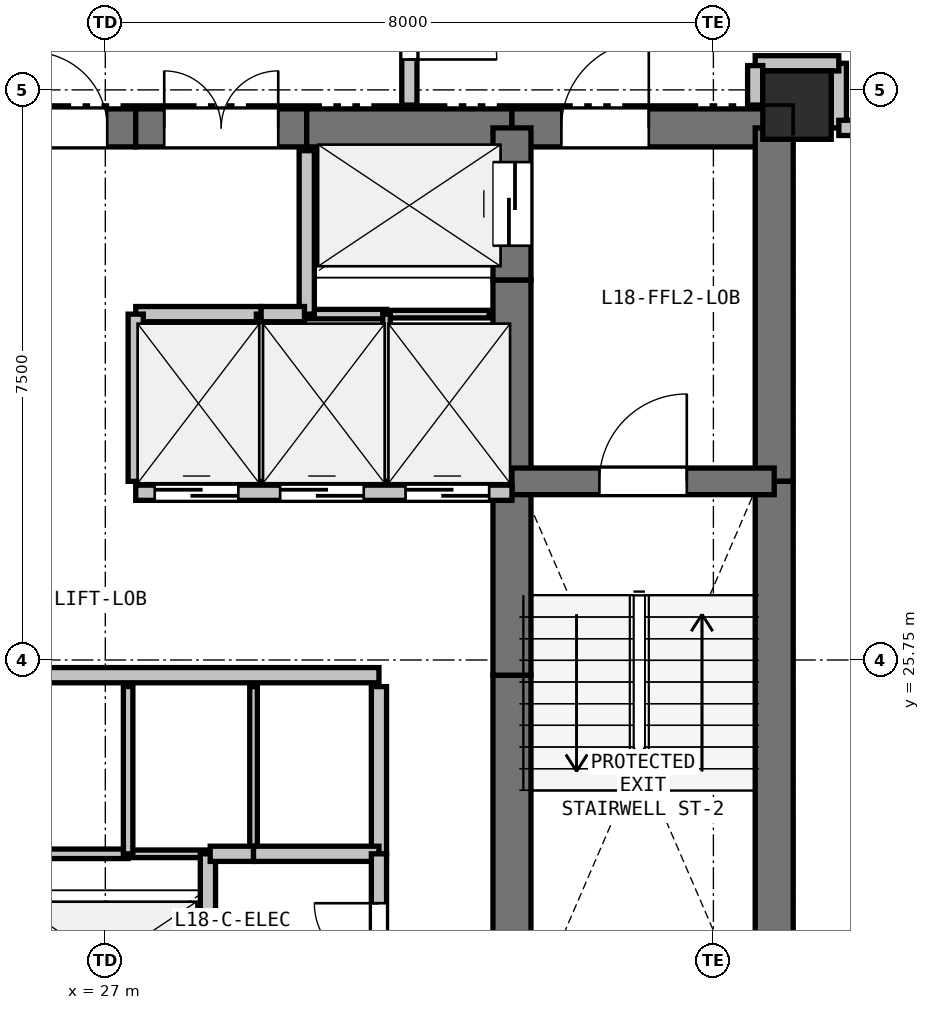
"""IFC4 building model, lengths in metres.
Left out: names, types, materials, properties, quantities, classifications, styles, units other than length and angle.
Written with IfcOpenShell. Run it as: python <this file> out.ifc"""

import sys

from ifc_helpers import new_model, si_unit, direction, frame, frame_2d, origin, origin_2d, place, context, subcontext, project, spatial, rectangle, extrude, element, fill, save


model = new_model("IFC4")
c1 = context("Model", 3, precision=1e-05, world=origin(), true_north=direction((0.0, 1.0)))
c2 = subcontext(c1, "Body", "Model", "MODEL_VIEW")
j1 = project(units=[si_unit("LENGTHUNIT", "METRE"), si_unit("PLANEANGLEUNIT", "RADIAN")], contexts=[c1])
p1 = place(None, origin())
s1 = spatial("IfcSite", under=j1, at=p1, CompositionType="ELEMENT")
p2 = place(p1, origin())
s2 = spatial("IfcBuilding", under=s1, at=p2, CompositionType="ELEMENT")
p3 = place(p2, frame((0.0, 0.0, 66.9)))
s3 = spatial("IfcBuildingStorey", under=s2, at=p3, CompositionType="ELEMENT", Elevation=66.9)
p4 = place(p3, frame((36.1, 33.05, 0.0), z_axis=(0.0, 0.0, 1.0), x_axis=(1.0, 0.0, 0.0)))
e1 = element("IfcColumn", 1, at=p4, inside=s3, PredefinedType="COLUMN", context=c2, shape_type="SweptSolid", body=[
    extrude(rectangle(XDim=0.9, YDim=0.9, at=origin_2d()), origin(), (0.0, 0.0, 1.0), 6.6),
])
for number, where, z_axis, x_axis in (
    (2, (7.087, 28.11, 0.0), (0.0, 0.0, 1.0), (0.866, 0.5, 0.0)),
    (3, (38.779, 7.092, 0.0), (0.0, 0.0, 1.0), (-0.866, 0.5, 0.0)),
):
    element("IfcWall", number, at=place(p3, frame(where, z_axis=z_axis, x_axis=x_axis)), inside=s3, PredefinedType="SOLIDWALL", context=c2, shape_type="SweptSolid", body=[
        extrude(rectangle(XDim=36.595, YDim=0.25, at=frame_2d((18.297, 0.0))), origin(), (0.0, 0.0, 1.0), 5.723),
    ])
p5 = place(p3, frame((25.65, 32.75, 0.0), z_axis=(0.0, 0.0, 1.0), x_axis=(1.0, 0.0, 0.0)))
e4 = element("IfcWall", 4, at=p5, inside=s3, PredefinedType="SHEAR", context=c2, shape_type="SweptSolid", body=[
    extrude(rectangle(XDim=1.75, YDim=0.5, at=frame_2d((0.875, 0.0))), origin(), (0.0, 0.0, 1.0), 6.35),
])
p6 = place(p5, frame((0.375, 0.0, 0.0)))
e5 = element("IfcOpeningElement", 5, at=p6, cuts=e4, PredefinedType="OPENING", context=c2, shape_type="SweptSolid", body=[
    extrude(rectangle(XDim=1.0, YDim=2.15, at=frame_2d((0.5, 1.075))), frame((0.0, 0.26, 0.0), z_axis=(0.0, -1.0, 0.0), x_axis=(1.0, 0.0, 0.0)), (0.0, 0.0, 1.0), 0.52),
])
p7 = place(p3, frame((27.4, 32.75, 0.0), z_axis=(0.0, 0.0, 1.0), x_axis=(1.0, 0.0, 0.0)))
e6 = element("IfcWall", 6, at=p7, inside=s3, PredefinedType="SHEAR", context=c2, shape_type="SweptSolid", body=[
    extrude(rectangle(XDim=2.25, YDim=0.5, at=frame_2d((1.125, 0.0))), origin(), (0.0, 0.0, 1.0), 6.35),
])
p8 = place(p7, frame((0.375, 0.0, 0.0)))
e7 = element("IfcOpeningElement", 7, at=p8, cuts=e6, PredefinedType="OPENING", context=c2, shape_type="SweptSolid", body=[
    extrude(rectangle(XDim=1.5, YDim=2.2, at=frame_2d((0.75, 1.1))), frame((0.0, 0.26, 0.0), z_axis=(0.0, -1.0, 0.0), x_axis=(1.0, 0.0, 0.0)), (0.0, 0.0, 1.0), 0.52),
])
p9 = place(p3, frame((29.65, 32.75, 0.0), z_axis=(0.0, 0.0, 1.0), x_axis=(1.0, 0.0, 0.0)))
e8 = element("IfcWall", 8, at=p9, inside=s3, PredefinedType="SHEAR", context=c2, shape_type="SweptSolid", body=[
    extrude(rectangle(XDim=2.7, YDim=0.5, at=frame_2d((1.35, 0.0))), origin(), (0.0, 0.0, 1.0), 6.35),
])
p10 = place(p3, frame((32.35, 32.75, 0.0), z_axis=(0.0, 0.0, 1.0), x_axis=(1.0, 0.0, 0.0)))
e9 = element("IfcWall", 9, at=p10, inside=s3, PredefinedType="SHEAR", context=c2, shape_type="SweptSolid", body=[
    extrude(rectangle(XDim=3.45, YDim=0.5, at=frame_2d((1.725, 0.0))), origin(), (0.0, 0.0, 1.0), 6.35),
])
p11 = place(p10, frame((0.65, 0.0, 0.0)))
e10 = element("IfcOpeningElement", 10, at=p11, cuts=e9, PredefinedType="OPENING", context=c2, shape_type="SweptSolid", body=[
    extrude(rectangle(XDim=1.15, YDim=2.15, at=frame_2d((0.575, 1.075))), frame((0.0, 0.26, 0.0), z_axis=(0.0, -1.0, 0.0), x_axis=(1.0, 0.0, 0.0)), (0.0, 0.0, 1.0), 0.52),
])
p12 = place(p3, frame((35.8, 32.75, 0.0), z_axis=(0.0, 0.0, 1.0), x_axis=(0.0, -1.0, 0.0)))
e11 = element("IfcWall", 11, at=p12, inside=s3, PredefinedType="SHEAR", context=c2, shape_type="SweptSolid", body=[
    extrude(rectangle(XDim=4.65, YDim=0.5, at=frame_2d((2.325, 0.0))), origin(), (0.0, 0.0, 1.0), 6.35),
])
p13 = place(p3, frame((35.8, 28.1, 0.0), z_axis=(0.0, 0.0, 1.0), x_axis=(0.0, -1.0, 0.0)))
e12 = element("IfcWall", 12, at=p13, inside=s3, PredefinedType="SHEAR", context=c2, shape_type="SweptSolid", body=[
    extrude(rectangle(XDim=7.35, YDim=0.5, at=frame_2d((3.675, 0.0))), origin(), (0.0, 0.0, 1.0), 6.35),
])
p14 = place(p3, frame((32.35, 20.75, 0.0), z_axis=(0.0, 0.0, 1.0), x_axis=(0.0, 1.0, 0.0)))
e13 = element("IfcWall", 13, at=p14, inside=s3, PredefinedType="SHEAR", context=c2, shape_type="SweptSolid", body=[
    extrude(rectangle(XDim=4.8, YDim=0.5, at=frame_2d((2.4, 0.0))), origin(), (0.0, 0.0, 1.0), 6.35),
])
p15 = place(p3, frame((32.35, 25.55, 0.0), z_axis=(0.0, 0.0, 1.0), x_axis=(0.0, 1.0, 0.0)))
e14 = element("IfcWall", 14, at=p15, inside=s3, PredefinedType="SHEAR", context=c2, shape_type="SweptSolid", body=[
    extrude(rectangle(XDim=2.4, YDim=0.5, at=frame_2d((1.2, 0.0))), origin(), (0.0, 0.0, 1.0), 6.35),
])
p16 = place(p3, frame((32.35, 27.95, 0.0), z_axis=(0.0, 0.0, 1.0), x_axis=(0.0, 1.0, 0.0)))
e15 = element("IfcWall", 15, at=p16, inside=s3, PredefinedType="SHEAR", context=c2, shape_type="SweptSolid", body=[
    extrude(rectangle(XDim=2.8, YDim=0.5, at=frame_2d((1.4, 0.0))), origin(), (0.0, 0.0, 1.0), 6.35),
])
p17 = place(p3, frame((32.35, 30.75, 0.0), z_axis=(0.0, 0.0, 1.0), x_axis=(0.0, 1.0, 0.0)))
e16 = element("IfcWall", 16, at=p17, inside=s3, PredefinedType="SHEAR", context=c2, shape_type="SweptSolid", body=[
    extrude(rectangle(XDim=2.0, YDim=0.5, at=frame_2d((1.0, 0.0))), origin(), (0.0, 0.0, 1.0), 6.35),
])
p18 = place(p17, frame((0.45, 0.0, 0.0)))
e17 = element("IfcOpeningElement", 17, at=p18, cuts=e16, PredefinedType="OPENING", context=c2, shape_type="SweptSolid", body=[
    extrude(rectangle(XDim=1.1, YDim=2.15, at=frame_2d((0.55, 1.075))), frame((0.0, 0.26, 0.0), z_axis=(0.0, -1.0, 0.0), x_axis=(1.0, 0.0, 0.0)), (0.0, 0.0, 1.0), 0.52),
])
p19 = place(p3, frame((32.35, 28.1, 0.0), z_axis=(0.0, 0.0, 1.0), x_axis=(1.0, 0.0, 0.0)))
e18 = element("IfcWall", 18, at=p19, inside=s3, PredefinedType="SHEAR", context=c2, shape_type="SweptSolid", body=[
    extrude(rectangle(XDim=3.45, YDim=0.35, at=frame_2d((1.725, 0.0))), origin(), (0.0, 0.0, 1.0), 6.35),
])
p20 = place(p19, frame((1.15, 0.0, 0.0)))
e19 = element("IfcOpeningElement", 19, at=p20, cuts=e18, PredefinedType="OPENING", context=c2, shape_type="SweptSolid", body=[
    extrude(rectangle(XDim=1.15, YDim=2.15, at=frame_2d((0.575, 1.075))), frame((0.0, 0.185, 0.0), z_axis=(0.0, -1.0, 0.0), x_axis=(1.0, 0.0, 0.0)), (0.0, 0.0, 1.0), 0.37),
])
p21 = place(p3, frame((25.65, 25.55, 0.0), z_axis=(0.0, 0.0, 1.0), x_axis=(1.0, 0.0, 0.0)))
e20 = element("IfcWall", 20, at=p21, inside=s3, PredefinedType="PARTITIONING", context=c2, shape_type="SweptSolid", body=[
    extrude(rectangle(XDim=4.95, YDim=0.2, at=frame_2d((2.475, 0.0))), origin(), (0.0, 0.0, 1.0), 6.35),
])
p22 = place(p3, frame((27.4, 27.95, 0.0), z_axis=(0.0, 0.0, 1.0), x_axis=(1.0, 0.0, 0.0)))
e21 = element("IfcWall", 21, at=p22, inside=s3, PredefinedType="PARTITIONING", context=c2, shape_type="SweptSolid", body=[
    extrude(rectangle(XDim=4.95, YDim=0.2, at=frame_2d((2.475, 0.0))), origin(), (0.0, 0.0, 1.0), 6.35),
])
p23 = place(p22, frame((0.25, 0.0, 0.0)))
e22 = element("IfcOpeningElement", 22, at=p23, cuts=e21, PredefinedType="OPENING", context=c2, shape_type="SweptSolid", body=[
    extrude(rectangle(XDim=1.1, YDim=2.15, at=frame_2d((0.55, 1.075))), frame((0.0, 0.11, 0.0), z_axis=(0.0, -1.0, 0.0), x_axis=(1.0, 0.0, 0.0)), (0.0, 0.0, 1.0), 0.22),
])
p24 = place(p22, frame((1.9, 0.0, 0.0)))
e23 = element("IfcOpeningElement", 23, at=p24, cuts=e21, PredefinedType="OPENING", context=c2, shape_type="SweptSolid", body=[
    extrude(rectangle(XDim=1.1, YDim=2.15, at=frame_2d((0.55, 1.075))), frame((0.0, 0.11, 0.0), z_axis=(0.0, -1.0, 0.0), x_axis=(1.0, 0.0, 0.0)), (0.0, 0.0, 1.0), 0.22),
])
p25 = place(p22, frame((3.55, 0.0, 0.0)))
e24 = element("IfcOpeningElement", 24, at=p25, cuts=e21, PredefinedType="OPENING", context=c2, shape_type="SweptSolid", body=[
    extrude(rectangle(XDim=1.1, YDim=2.15, at=frame_2d((0.55, 1.075))), frame((0.0, 0.11, 0.0), z_axis=(0.0, -1.0, 0.0), x_axis=(1.0, 0.0, 0.0)), (0.0, 0.0, 1.0), 0.22),
])
p26 = place(p3, frame((25.95, 23.2, 0.0), z_axis=(0.0, 0.0, 1.0), x_axis=(1.0, 0.0, 0.0)))
e25 = element("IfcWall", 25, at=p26, inside=s3, PredefinedType="PARTITIONING", context=c2, shape_type="SweptSolid", body=[
    extrude(rectangle(XDim=1.35, YDim=0.125, at=frame_2d((0.675, 0.0))), origin(), (0.0, 0.0, 1.0), 6.35),
])
p27 = place(p3, frame((27.3, 23.2, 0.0), z_axis=(0.0, 0.0, 1.0), x_axis=(1.0, 0.0, 0.0)))
e26 = element("IfcWall", 26, at=p27, inside=s3, PredefinedType="PARTITIONING", context=c2, shape_type="SweptSolid", body=[
    extrude(rectangle(XDim=1.05, YDim=0.1, at=frame_2d((0.525, 0.0))), origin(), (0.0, 0.0, 1.0), 6.35),
])
p28 = place(p3, frame((28.35, 23.2, 0.0), z_axis=(0.0, 0.0, 1.0), x_axis=(0.0, -1.0, 0.0)))
e27 = element("IfcWall", 27, at=p28, inside=s3, PredefinedType="PARTITIONING", context=c2, shape_type="SweptSolid", body=[
    extrude(rectangle(XDim=2.15, YDim=0.2, at=frame_2d((1.075, 0.0))), origin(), (0.0, 0.0, 1.0), 6.35),
])
p29 = place(p3, frame((32.05, 30.3, 0.0), z_axis=(0.0, 0.0, 1.0), x_axis=(-1.0, 0.0, 0.0)))
e28 = element("IfcWall", 28, at=p29, inside=s3, PredefinedType="PARTITIONING", context=c2, shape_type="SweptSolid", body=[
    extrude(rectangle(XDim=1.35, YDim=0.1, at=frame_2d((0.675, 0.0))), origin(), (0.0, 0.0, 1.0), 6.35),
])
p30 = place(p3, frame((30.7, 30.3, 0.0), z_axis=(0.0, 0.0, 1.0), x_axis=(-1.0, 0.0, 0.0)))
e29 = element("IfcWall", 29, at=p30, inside=s3, PredefinedType="PARTITIONING", context=c2, shape_type="SweptSolid", body=[
    extrude(rectangle(XDim=1.05, YDim=0.125, at=frame_2d((0.525, 0.0))), origin(), (0.0, 0.0, 1.0), 6.35),
])
p31 = place(p3, frame((29.65, 30.3, 0.0), z_axis=(0.0, 0.0, 1.0), x_axis=(0.0, 1.0, 0.0)))
e30 = element("IfcWall", 30, at=p31, inside=s3, PredefinedType="PARTITIONING", context=c2, shape_type="SweptSolid", body=[
    extrude(rectangle(XDim=2.15, YDim=0.2, at=frame_2d((1.075, 0.0))), origin(), (0.0, 0.0, 1.0), 6.35),
])
p32 = place(p3, frame((27.3, 25.4, 0.0), z_axis=(0.0, 0.0, 1.0), x_axis=(0.0, -1.0, 0.0)))
e31 = element("IfcWall", 31, at=p32, inside=s3, PredefinedType="PARTITIONING", context=c2, shape_type="SweptSolid", body=[
    extrude(rectangle(XDim=2.2, YDim=0.125, at=frame_2d((1.1, 0.0))), origin(), (0.0, 0.0, 1.0), 6.35),
])
p33 = place(p3, frame((28.95, 25.4, 0.0), z_axis=(0.0, 0.0, 1.0), x_axis=(0.0, -1.0, 0.0)))
e32 = element("IfcWall", 32, at=p33, inside=s3, PredefinedType="PARTITIONING", context=c2, shape_type="SweptSolid", body=[
    extrude(rectangle(XDim=2.2, YDim=0.1, at=frame_2d((1.1, 0.0))), origin(), (0.0, 0.0, 1.0), 6.35),
])
p34 = place(p3, frame((28.95, 23.2, 0.0), z_axis=(0.0, 0.0, 1.0), x_axis=(-1.0, 0.0, 0.0)))
e33 = element("IfcWall", 33, at=p34, inside=s3, PredefinedType="PARTITIONING", context=c2, shape_type="SweptSolid", body=[
    extrude(rectangle(XDim=0.57, YDim=0.2, at=frame_2d((0.285, 0.0))), origin(), (0.0, 0.0, 1.0), 6.35),
])
p35 = place(p3, frame((30.6, 25.4, 0.0), z_axis=(0.0, 0.0, 1.0), x_axis=(0.0, -1.0, 0.0)))
e34 = element("IfcWall", 34, at=p35, inside=s3, PredefinedType="PARTITIONING", context=c2, shape_type="SweptSolid", body=[
    extrude(rectangle(XDim=2.2, YDim=0.2, at=frame_2d((1.1, 0.0))), origin(), (0.0, 0.0, 1.0), 6.35),
])
for number, where, z_axis, x_axis in (
    (35, (30.6, 23.2, 0.0), (0.0, 0.0, 1.0), (-1.0, 0.0, 0.0)),
    (36, (27.4, 30.3, 0.0), (0.0, 0.0, 1.0), (1.0, 0.0, 0.0)),
):
    element("IfcWall", number, at=place(p3, frame(where, z_axis=z_axis, x_axis=x_axis)), inside=s3, PredefinedType="PARTITIONING", context=c2, shape_type="SweptSolid", body=[
        extrude(rectangle(XDim=1.65, YDim=0.2, at=frame_2d((0.825, 0.0))), origin(), (0.0, 0.0, 1.0), 6.35),
    ])
p36 = place(p3, frame((29.05, 30.3, 0.0), z_axis=(0.0, 0.0, 1.0), x_axis=(0.0, -1.0, 0.0)))
e37 = element("IfcWall", 37, at=p36, inside=s3, PredefinedType="PARTITIONING", context=c2, shape_type="SweptSolid", body=[
    extrude(rectangle(XDim=2.2, YDim=0.125, at=frame_2d((1.1, 0.0))), origin(), (0.0, 0.0, 1.0), 6.35),
])
p37 = place(p3, frame((27.4, 28.1, 0.0), z_axis=(0.0, 0.0, 1.0), x_axis=(0.0, 1.0, 0.0)))
e38 = element("IfcWall", 38, at=p37, inside=s3, PredefinedType="PARTITIONING", context=c2, shape_type="SweptSolid", body=[
    extrude(rectangle(XDim=2.2, YDim=0.2, at=frame_2d((1.1, 0.0))), origin(), (0.0, 0.0, 1.0), 6.35),
])
p38 = place(p3, frame((29.05, 30.3, 0.0), z_axis=(0.0, 0.0, 1.0), x_axis=(1.0, 0.0, 0.0)))
e39 = element("IfcWall", 39, at=p38, inside=s3, PredefinedType="PARTITIONING", context=c2, shape_type="SweptSolid", body=[
    extrude(rectangle(XDim=0.57, YDim=0.2, at=frame_2d((0.285, 0.0))), origin(), (0.0, 0.0, 1.0), 6.35),
])
p39 = place(p3, frame((30.7, 30.3, 0.0), z_axis=(0.0, 0.0, 1.0), x_axis=(0.0, -1.0, 0.0)))
e40 = element("IfcWall", 40, at=p39, inside=s3, PredefinedType="PARTITIONING", context=c2, shape_type="SweptSolid", body=[
    extrude(rectangle(XDim=2.2, YDim=0.1, at=frame_2d((1.1, 0.0))), origin(), (0.0, 0.0, 1.0), 6.35),
])
p40 = place(p3, frame((30.6, 21.05, 0.0), z_axis=(0.0, 0.0, 1.0), x_axis=(0.0, 1.0, 0.0)))
e41 = element("IfcWall", 41, at=p40, inside=s3, PredefinedType="PARTITIONING", context=c2, shape_type="SweptSolid", body=[
    extrude(rectangle(XDim=2.15, YDim=0.2, at=frame_2d((1.075, 0.0))), origin(), (0.0, 0.0, 1.0), 6.35),
])
p41 = place(p40, frame((0.65, 0.0, 0.0)))
e42 = element("IfcOpeningElement", 42, at=p41, cuts=e41, PredefinedType="OPENING", context=c2, shape_type="SweptSolid", body=[
    extrude(rectangle(XDim=0.85, YDim=2.1, at=frame_2d((0.425, 1.05))), frame((0.0, 0.11, 0.0), z_axis=(0.0, -1.0, 0.0), x_axis=(1.0, 0.0, 0.0)), (0.0, 0.0, 1.0), 0.22),
])
p42 = place(p3, frame((31.0, 35.4, 0.0), z_axis=(0.0, 0.0, 1.0), x_axis=(0.0, -1.0, 0.0)))
e43 = element("IfcWall", 43, at=p42, inside=s3, PredefinedType="PARTITIONING", context=c2, shape_type="SweptSolid", body=[
    extrude(rectangle(XDim=2.35, YDim=0.2, at=frame_2d((1.175, 0.0))), origin(), (0.0, 0.0, 1.0), 5.798),
])
p43 = place(p42, frame((0.6, 0.0, 0.0)))
e44 = element("IfcOpeningElement", 44, at=p43, cuts=e43, PredefinedType="OPENING", context=c2, shape_type="SweptSolid", body=[
    extrude(rectangle(XDim=1.15, YDim=2.15, at=frame_2d((0.575, 1.075))), frame((0.0, 0.11, 0.0), z_axis=(0.0, -1.0, 0.0), x_axis=(1.0, 0.0, 0.0)), (0.0, 0.0, 1.0), 0.22),
])
p44 = place(p3, frame((36.65, 32.75, 0.0), z_axis=(0.0, 0.0, 1.0), x_axis=(0.0, 1.0, 0.0)))
e45 = element("IfcWall", 45, at=p44, inside=s3, PredefinedType="PARTITIONING", context=c2, shape_type="SweptSolid", body=[
    extrude(rectangle(XDim=0.85, YDim=0.2, at=frame_2d((0.425, 0.0))), origin(), (0.0, 0.0, 1.0), 5.723),
])
p45 = place(p3, frame((36.65, 33.6, 0.0), z_axis=(0.0, 0.0, 1.0), x_axis=(-1.0, 0.0, 0.0)))
e46 = element("IfcWall", 46, at=p45, inside=s3, PredefinedType="PARTITIONING", context=c2, shape_type="SweptSolid", body=[
    extrude(rectangle(XDim=1.1, YDim=0.2, at=frame_2d((0.55, 0.0))), origin(), (0.0, 0.0, 1.0), 5.723),
])
p46 = place(p3, frame((35.55, 33.57, 0.0), z_axis=(0.0, 0.0, 1.0), x_axis=(0.0, -1.0, 0.0)))
e47 = element("IfcWall", 47, at=p46, inside=s3, PredefinedType="PARTITIONING", context=c2, shape_type="SweptSolid", body=[
    extrude(rectangle(XDim=0.52, YDim=0.2, at=frame_2d((0.26, 0.0))), origin(), (0.0, 0.0, 1.0), 5.798),
])
p47 = place(p3, frame((40.986, 32.75, 0.0), z_axis=(0.0, 0.0, 1.0), x_axis=(-1.0, 0.0, 0.0)))
e48 = element("IfcWall", 48, at=p47, inside=s3, PredefinedType="PARTITIONING", context=c2, shape_type="SweptSolid", body=[
    extrude(rectangle(XDim=4.336, YDim=0.2, at=frame_2d((2.168, 0.0))), origin(), (0.0, 0.0, 1.0), 6.35),
])
p48 = place(p23, origin())
e49 = element("IfcDoor", 49, at=p48, inside=s3, OperationType="SLIDING_TO_LEFT", PredefinedType="DOOR", context=c2, shape_type="SweptSolid", body=[
    extrude(rectangle(XDim=1.1, YDim=2.15, at=frame_2d((0.55, 1.075))), frame((0.0, 0.025, 0.0), z_axis=(0.0, -1.0, 0.0), x_axis=(1.0, 0.0, 0.0)), (0.0, 0.0, 1.0), 0.05),
])
fill(e22, e49)
p49 = place(p24, origin())
e50 = element("IfcDoor", 50, at=p49, inside=s3, OperationType="SLIDING_TO_LEFT", PredefinedType="DOOR", context=c2, shape_type="SweptSolid", body=[
    extrude(rectangle(XDim=1.1, YDim=2.15, at=frame_2d((0.55, 1.075))), frame((0.0, 0.025, 0.0), z_axis=(0.0, -1.0, 0.0), x_axis=(1.0, 0.0, 0.0)), (0.0, 0.0, 1.0), 0.05),
])
fill(e23, e50)
p50 = place(p25, origin())
e51 = element("IfcDoor", 51, at=p50, inside=s3, OperationType="SLIDING_TO_LEFT", PredefinedType="DOOR", context=c2, shape_type="SweptSolid", body=[
    extrude(rectangle(XDim=1.1, YDim=2.15, at=frame_2d((0.55, 1.075))), frame((0.0, 0.025, 0.0), z_axis=(0.0, -1.0, 0.0), x_axis=(1.0, 0.0, 0.0)), (0.0, 0.0, 1.0), 0.05),
])
fill(e24, e51)
p51 = place(p6, origin())
e52 = element("IfcDoor", 52, at=p51, inside=s3, OperationType="SINGLE_SWING_LEFT", PredefinedType="DOOR", context=c2, shape_type="SweptSolid", body=[
    extrude(rectangle(XDim=1.0, YDim=2.15, at=frame_2d((0.5, 1.075))), frame((0.0, 0.025, 0.0), z_axis=(0.0, -1.0, 0.0), x_axis=(1.0, 0.0, 0.0)), (0.0, 0.0, 1.0), 0.05),
])
fill(e5, e52)
p52 = place(p18, origin())
e53 = element("IfcDoor", 53, at=p52, inside=s3, OperationType="SLIDING_TO_LEFT", PredefinedType="DOOR", context=c2, shape_type="SweptSolid", body=[
    extrude(rectangle(XDim=1.1, YDim=2.15, at=frame_2d((0.55, 1.075))), frame((0.0, 0.025, 0.0), z_axis=(0.0, -1.0, 0.0), x_axis=(1.0, 0.0, 0.0)), (0.0, 0.0, 1.0), 0.05),
])
fill(e17, e53)
p53 = place(p20, origin())
e54 = element("IfcDoor", 54, at=p53, inside=s3, OperationType="SINGLE_SWING_RIGHT", PredefinedType="DOOR", context=c2, shape_type="SweptSolid", body=[
    extrude(rectangle(XDim=1.15, YDim=2.15, at=frame_2d((0.575, 1.075))), frame((0.0, 0.025, 0.0), z_axis=(0.0, -1.0, 0.0), x_axis=(1.0, 0.0, 0.0)), (0.0, 0.0, 1.0), 0.05),
])
fill(e19, e54)
p54 = place(p11, origin())
e55 = element("IfcDoor", 55, at=p54, inside=s3, OperationType="SINGLE_SWING_RIGHT", PredefinedType="DOOR", context=c2, shape_type="SweptSolid", body=[
    extrude(rectangle(XDim=1.15, YDim=2.15, at=frame_2d((0.575, 1.075))), frame((0.0, 0.025, 0.0), z_axis=(0.0, -1.0, 0.0), x_axis=(1.0, 0.0, 0.0)), (0.0, 0.0, 1.0), 0.05),
])
fill(e10, e55)
p55 = place(p8, origin())
e56 = element("IfcDoor", 56, at=p55, inside=s3, OperationType="DOUBLE_DOOR_SINGLE_SWING", PredefinedType="DOOR", context=c2, shape_type="SweptSolid", body=[
    extrude(rectangle(XDim=1.5, YDim=2.2, at=frame_2d((0.75, 1.1))), frame((0.0, 0.025, 0.0), z_axis=(0.0, -1.0, 0.0), x_axis=(1.0, 0.0, 0.0)), (0.0, 0.0, 1.0), 0.05),
])
fill(e7, e56)
p56 = place(p41, origin())
e57 = element("IfcDoor", 57, at=p56, inside=s3, OperationType="SINGLE_SWING_RIGHT", PredefinedType="DOOR", context=c2, shape_type="SweptSolid", body=[
    extrude(rectangle(XDim=0.85, YDim=2.1, at=frame_2d((0.425, 1.05))), frame((0.0, 0.025, 0.0), z_axis=(0.0, -1.0, 0.0), x_axis=(1.0, 0.0, 0.0)), (0.0, 0.0, 1.0), 0.05),
])
fill(e42, e57)
p57 = place(p43, origin())
e58 = element("IfcDoor", 58, at=p57, inside=s3, OperationType="SINGLE_SWING_RIGHT", PredefinedType="DOOR", context=c2, shape_type="SweptSolid", body=[
    extrude(rectangle(XDim=1.15, YDim=2.15, at=frame_2d((0.575, 1.075))), frame((0.0, 0.025, 0.0), z_axis=(0.0, -1.0, 0.0), x_axis=(1.0, 0.0, 0.0)), (0.0, 0.0, 1.0), 0.05),
])
fill(e44, e58)
save(model, sys.argv[1])
